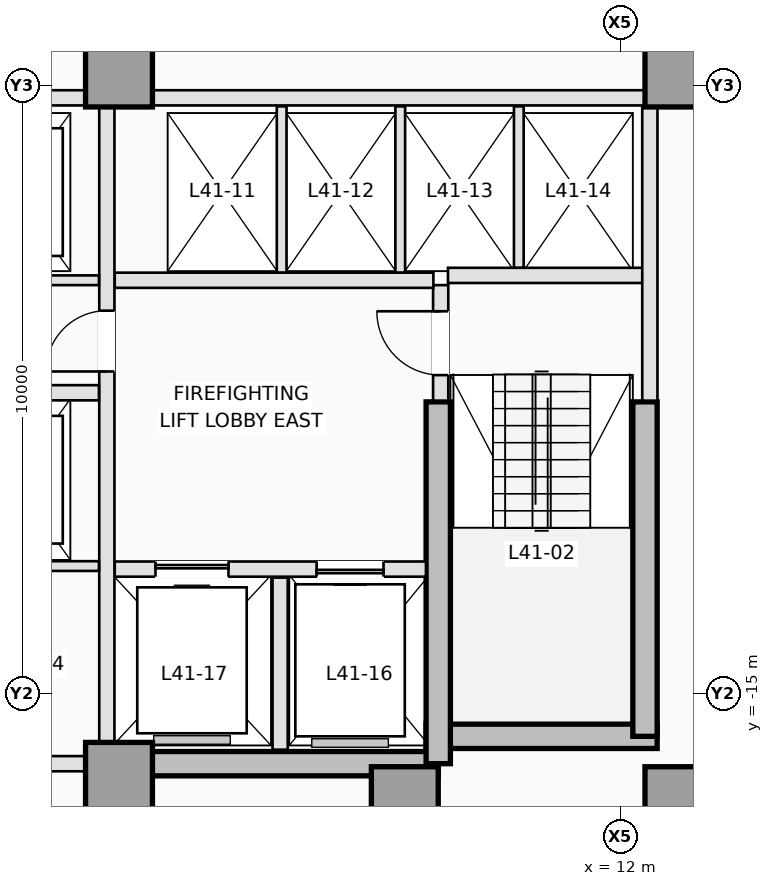
"""IFC4 building model, lengths in metres.
Left out: names, types, materials, properties, quantities, classifications, styles, units other than length and angle.
Written with IfcOpenShell. Run it as: python <this file> out.ifc"""

import sys

from ifc_helpers import new_model, si_unit, direction, frame, frame_2d, origin, origin_2d, place, context, subcontext, project, spatial, rectangle, extrude, element, fill, save


model = new_model("IFC4")
c1 = context("Model", 3, precision=1e-05, world=origin(), true_north=direction((0.0, 1.0)))
c2 = subcontext(c1, "Body", "Model", "MODEL_VIEW")
j1 = project(units=[si_unit("LENGTHUNIT", "METRE"), si_unit("PLANEANGLEUNIT", "RADIAN")], contexts=[c1])
p1 = place(None, origin())
s1 = spatial("IfcSite", under=j1, at=p1, CompositionType="ELEMENT")
p2 = place(p1, origin())
s2 = spatial("IfcBuilding", under=s1, at=p2, CompositionType="ELEMENT")
p3 = place(p2, frame((0.0, 0.0, 151.0)))
s3 = spatial("IfcBuildingStorey", under=s2, at=p3, CompositionType="ELEMENT", Elevation=151.0)
p4 = place(p3, frame((3.75, -16.15, 0.0), z_axis=(0.0, 0.0, 1.0), x_axis=(1.0, 0.0, 0.0)))
e1 = element("IfcWall", 1, at=p4, inside=s3, PredefinedType="SHEAR", context=c2, shape_type="SweptSolid", body=[
    extrude(rectangle(XDim=5.25, YDim=0.4, at=frame_2d((2.625, 0.0))), origin(), (0.0, 0.0, 1.0), 3.5),
])
p5 = place(p3, frame((8.8, -15.7, 0.0), z_axis=(0.0, 0.0, 1.0), x_axis=(1.0, 0.0, 0.0)))
e2 = element("IfcWall", 2, at=p5, inside=s3, PredefinedType="SHEAR", context=c2, shape_type="SweptSolid", body=[
    extrude(rectangle(XDim=3.8, YDim=0.4, at=frame_2d((1.9, 0.0))), origin(), (0.0, 0.0, 1.0), 3.5),
])
p6 = place(p3, frame((12.4, -15.7, 0.0), z_axis=(0.0, 0.0, 1.0), x_axis=(0.0, 1.0, 0.0)))
e3 = element("IfcWall", 3, at=p6, inside=s3, PredefinedType="SHEAR", context=c2, shape_type="SweptSolid", body=[
    extrude(rectangle(XDim=5.5, YDim=0.4, at=frame_2d((2.75, 0.0))), origin(), (0.0, 0.0, 1.0), 3.5),
])
p7 = place(p3, frame((9.0, -16.15, 0.0), z_axis=(0.0, 0.0, 1.0), x_axis=(0.0, 1.0, 0.0)))
e4 = element("IfcWall", 4, at=p7, inside=s3, PredefinedType="SHEAR", context=c2, shape_type="SweptSolid", body=[
    extrude(rectangle(XDim=5.95, YDim=0.4, at=frame_2d((2.975, 0.0))), origin(), (0.0, 0.0, 1.0), 3.5),
])
for number, where, z_axis, x_axis in (
    (5, (3.75, -16.35, 0.0), (0.0, 0.0, 1.0), (1.0, 0.0, 0.0)),
    (6, (8.45, -16.75, 0.0), (0.0, 0.0, 1.0), (1.0, 0.0, 0.0)),
    (7, (12.95, -16.75, 0.0), (0.0, 0.0, 1.0), (1.0, 0.0, 0.0)),
    (8, (3.75, -4.8, 0.0), (0.0, 0.0, 1.0), (1.0, 0.0, 0.0)),
    (9, (12.95, -4.8, 0.0), (0.0, 0.0, 1.0), (1.0, 0.0, 0.0)),
):
    element("IfcColumn", number, at=place(p3, frame(where, z_axis=z_axis, x_axis=x_axis)), inside=s3, PredefinedType="COLUMN", context=c2, shape_type="SweptSolid", body=[
        extrude(rectangle(XDim=1.1, YDim=1.1, at=origin_2d()), origin(), (0.0, 0.0, 1.0), 3.5),
    ])
p8 = place(p3, frame((9.04, -10.18, 0.0), z_axis=(0.0, 0.0, 1.0), x_axis=(0.0, 1.0, 0.0)))
e10 = element("IfcWall", 10, at=p8, inside=s3, PredefinedType="PARTITIONING", context=c2, shape_type="SweptSolid", body=[
    extrude(rectangle(XDim=1.9, YDim=0.25, at=frame_2d((0.95, 0.0))), origin(), (0.0, 0.0, 1.0), 3.25),
])
p9 = place(p8, frame((0.42, 0.0, 0.0)))
e11 = element("IfcOpeningElement", 11, at=p9, cuts=e10, PredefinedType="OPENING", context=c2, shape_type="SweptSolid", body=[
    extrude(rectangle(XDim=1.05, YDim=2.15, at=frame_2d((0.525, 1.075))), frame((0.0, 0.135, 0.0), z_axis=(0.0, -1.0, 0.0), x_axis=(1.0, 0.0, 0.0)), (0.0, 0.0, 1.0), 0.27),
])
p10 = place(p3, frame((9.16, -8.12, 0.0), z_axis=(0.0, 0.0, 1.0), x_axis=(1.0, 0.0, 0.0)))
e12 = element("IfcWall", 12, at=p10, inside=s3, PredefinedType="PARTITIONING", context=c2, shape_type="SweptSolid", body=[
    extrude(rectangle(XDim=3.22, YDim=0.25, at=frame_2d((1.61, 0.0))), origin(), (0.0, 0.0, 1.0), 3.25),
])
p11 = place(p3, frame((12.48, -10.18, 0.0), z_axis=(0.0, 0.0, 1.0), x_axis=(0.0, 1.0, 0.0)))
e13 = element("IfcWall", 13, at=p11, inside=s3, PredefinedType="PARTITIONING", context=c2, shape_type="SweptSolid", body=[
    extrude(rectangle(XDim=4.828, YDim=0.25, at=frame_2d((2.414, 0.0))), origin(), (0.0, 0.0, 1.0), 3.25),
])
p12 = place(p3, frame((3.68, -12.95, 0.0), z_axis=(0.0, 0.0, 1.0), x_axis=(1.0, 0.0, 0.0)))
e14 = element("IfcWall", 14, at=p12, inside=s3, PredefinedType="PARTITIONING", context=c2, shape_type="SweptSolid", body=[
    extrude(rectangle(XDim=5.118, YDim=0.25, at=frame_2d((2.559, 0.0))), origin(), (0.0, 0.0, 1.0), 3.25),
])
p13 = place(p12, frame((3.32, 0.0, 0.0)))
e15 = element("IfcOpeningElement", 15, at=p13, cuts=e14, PredefinedType="OPENING", context=c2, shape_type="SweptSolid", body=[
    extrude(rectangle(XDim=1.1, YDim=2.15, at=frame_2d((0.55, 1.075))), frame((0.0, 0.135, 0.0), z_axis=(0.0, -1.0, 0.0), x_axis=(1.0, 0.0, 0.0)), (0.0, 0.0, 1.0), 0.27),
])
p14 = place(p12, frame((0.67, 0.0, 0.0)))
e16 = element("IfcOpeningElement", 16, at=p14, cuts=e14, PredefinedType="OPENING", context=c2, shape_type="SweptSolid", body=[
    extrude(rectangle(XDim=1.2, YDim=2.15, at=frame_2d((0.6, 1.075))), frame((0.0, 0.135, 0.0), z_axis=(0.0, -1.0, 0.0), x_axis=(1.0, 0.0, 0.0)), (0.0, 0.0, 1.0), 0.27),
])
p15 = place(p3, frame((6.4, -15.92, 0.0), z_axis=(0.0, 0.0, 1.0), x_axis=(0.0, 1.0, 0.0)))
e17 = element("IfcWall", 17, at=p15, inside=s3, PredefinedType="PARTITIONING", context=c2, shape_type="SweptSolid", body=[
    extrude(rectangle(XDim=2.83, YDim=0.25, at=frame_2d((1.415, 0.0))), origin(), (0.0, 0.0, 1.0), 3.25),
])
p16 = place(p3, frame((3.68, -8.2, 0.0), z_axis=(0.0, 0.0, 1.0), x_axis=(1.0, 0.0, 0.0)))
e18 = element("IfcWall", 18, at=p16, inside=s3, PredefinedType="PARTITIONING", context=c2, shape_type="SweptSolid", body=[
    extrude(rectangle(XDim=5.24, YDim=0.25, at=frame_2d((2.62, 0.0))), origin(), (0.0, 0.0, 1.0), 3.25),
])
p17 = place(p3, frame((3.55, -15.798, 0.0), z_axis=(0.0, 0.0, 1.0), x_axis=(0.0, 1.0, 0.0)))
e19 = element("IfcWall", 19, at=p17, inside=s3, PredefinedType="PARTITIONING", context=c2, shape_type="SweptSolid", body=[
    extrude(rectangle(XDim=10.446, YDim=0.25, at=frame_2d((5.223, 0.0))), origin(), (0.0, 0.0, 1.0), 3.25),
])
p18 = place(p17, frame((6.098, 0.0, 0.0)))
e20 = element("IfcOpeningElement", 20, at=p18, cuts=e19, PredefinedType="OPENING", context=c2, shape_type="SweptSolid", body=[
    extrude(rectangle(XDim=1.0, YDim=2.15, at=frame_2d((0.5, 1.075))), frame((0.0, 0.135, 0.0), z_axis=(0.0, -1.0, 0.0), x_axis=(1.0, 0.0, 0.0)), (0.0, 0.0, 1.0), 0.27),
])
p19 = place(p3, frame((4.302, -5.2, 0.0), z_axis=(0.0, 0.0, 1.0), x_axis=(1.0, 0.0, 0.0)))
e21 = element("IfcWall", 21, at=p19, inside=s3, PredefinedType="PARTITIONING", context=c2, shape_type="SweptSolid", body=[
    extrude(rectangle(XDim=8.096, YDim=0.25, at=frame_2d((4.048, 0.0))), origin(), (0.0, 0.0, 1.0), 3.25),
])
p20 = place(p3, frame((0.95, -5.2, 0.0), z_axis=(0.0, 0.0, 1.0), x_axis=(1.0, 0.0, 0.0)))
e22 = element("IfcWall", 22, at=p20, inside=s3, PredefinedType="PARTITIONING", context=c2, shape_type="SweptSolid", body=[
    extrude(rectangle(XDim=2.248, YDim=0.25, at=frame_2d((1.124, 0.0))), origin(), (0.0, 0.0, 1.0), 3.25),
])
p21 = place(p20, frame((0.55, 0.0, 0.0)))
e23 = element("IfcOpeningElement", 23, at=p21, cuts=e22, PredefinedType="OPENING", context=c2, shape_type="SweptSolid", body=[
    extrude(rectangle(XDim=1.0, YDim=2.15, at=frame_2d((0.5, 1.075))), frame((0.0, 0.135, 0.0), z_axis=(0.0, -1.0, 0.0), x_axis=(1.0, 0.0, 0.0)), (0.0, 0.0, 1.0), 0.27),
])
for number, where, z_axis, x_axis in (
    (24, (6.425, -8.073, 0.0), (0.0, 0.0, 1.0), (0.0, 1.0, 0.0)),
    (25, (8.375, -8.073, 0.0), (0.0, 0.0, 1.0), (0.0, 1.0, 0.0)),
):
    element("IfcWall", number, at=place(p3, frame(where, z_axis=z_axis, x_axis=x_axis)), inside=s3, PredefinedType="PARTITIONING", context=c2, shape_type="SweptSolid", body=[
        extrude(rectangle(XDim=2.733, YDim=0.16, at=frame_2d((1.366, 0.0))), origin(), (0.0, 0.0, 1.0), 3.25),
    ])
p22 = place(p3, frame((10.325, -7.993, 0.0), z_axis=(0.0, 0.0, 1.0), x_axis=(0.0, 1.0, 0.0)))
e26 = element("IfcWall", 26, at=p22, inside=s3, PredefinedType="PARTITIONING", context=c2, shape_type="SweptSolid", body=[
    extrude(rectangle(XDim=2.653, YDim=0.16, at=frame_2d((1.326, 0.0))), origin(), (0.0, 0.0, 1.0), 3.25),
])
p23 = place(p3, frame((-3.198, -16.15, 0.0), z_axis=(0.0, 0.0, 1.0), x_axis=(1.0, 0.0, 0.0)))
e27 = element("IfcWall", 27, at=p23, inside=s3, PredefinedType="PARTITIONING", context=c2, shape_type="SweptSolid", body=[
    extrude(rectangle(XDim=6.396, YDim=0.25, at=frame_2d((3.198, 0.0))), origin(), (0.0, 0.0, 1.0), 2.45),
])
p24 = place(p3, frame((0.95, -8.2, 0.0), z_axis=(0.0, 0.0, 1.0), x_axis=(1.0, 0.0, 0.0)))
e28 = element("IfcWall", 28, at=p24, inside=s3, PredefinedType="PARTITIONING", context=c2, shape_type="SweptSolid", body=[
    extrude(rectangle(XDim=2.47, YDim=0.16, at=frame_2d((1.235, 0.0))), origin(), (0.0, 0.0, 1.0), 3.25),
])
p25 = place(p3, frame((0.95, -10.05, 0.0), z_axis=(0.0, 0.0, 1.0), x_axis=(1.0, 0.0, 0.0)))
e29 = element("IfcWall", 29, at=p25, inside=s3, PredefinedType="PARTITIONING", context=c2, shape_type="SweptSolid", body=[
    extrude(rectangle(XDim=2.47, YDim=0.25, at=frame_2d((1.235, 0.0))), origin(), (0.0, 0.0, 1.0), 3.25),
])
p26 = place(p25, frame((0.55, 0.0, 0.0)))
e30 = element("IfcOpeningElement", 30, at=p26, cuts=e29, PredefinedType="OPENING", context=c2, shape_type="SweptSolid", body=[
    extrude(rectangle(XDim=1.0, YDim=2.15, at=frame_2d((0.5, 1.075))), frame((0.0, 0.135, 0.0), z_axis=(0.0, -1.0, 0.0), x_axis=(1.0, 0.0, 0.0)), (0.0, 0.0, 1.0), 0.27),
])
p27 = place(p3, frame((-3.42, -12.9, 0.0), z_axis=(0.0, 0.0, 1.0), x_axis=(1.0, 0.0, 0.0)))
e31 = element("IfcWall", 31, at=p27, inside=s3, PredefinedType="PARTITIONING", context=c2, shape_type="SweptSolid", body=[
    extrude(rectangle(XDim=6.84, YDim=0.16, at=frame_2d((3.42, 0.0))), origin(), (0.0, 0.0, 1.0), 3.25),
])
p28 = place(p27, frame((2.98, 0.0, 0.0)))
e32 = element("IfcOpeningElement", 32, at=p28, cuts=e31, PredefinedType="OPENING", context=c2, shape_type="SweptSolid", body=[
    extrude(rectangle(XDim=0.88, YDim=2.12, at=frame_2d((0.44, 1.06))), frame((0.0, 0.09, 0.0), z_axis=(0.0, -1.0, 0.0), x_axis=(1.0, 0.0, 0.0)), (0.0, 0.0, 1.0), 0.18),
])
p29 = place(p13, origin())
e33 = element("IfcDoor", 33, at=p29, inside=s3, OperationType="SLIDING_TO_RIGHT", PredefinedType="DOOR", context=c2, shape_type="SweptSolid", body=[
    extrude(rectangle(XDim=1.1, YDim=2.15, at=frame_2d((0.55, 1.075))), frame((0.0, 0.025, 0.0), z_axis=(0.0, -1.0, 0.0), x_axis=(1.0, 0.0, 0.0)), (0.0, 0.0, 1.0), 0.05),
])
fill(e15, e33)
p30 = place(p14, origin())
e34 = element("IfcDoor", 34, at=p30, inside=s3, OperationType="SLIDING_TO_LEFT", PredefinedType="DOOR", context=c2, shape_type="SweptSolid", body=[
    extrude(rectangle(XDim=1.2, YDim=2.15, at=frame_2d((0.6, 1.075))), frame((0.0, 0.025, 0.0), z_axis=(0.0, -1.0, 0.0), x_axis=(1.0, 0.0, 0.0)), (0.0, 0.0, 1.0), 0.05),
])
fill(e16, e34)
p31 = place(p9, origin())
e35 = element("IfcDoor", 35, at=p31, inside=s3, OperationType="SINGLE_SWING_RIGHT", PredefinedType="DOOR", context=c2, shape_type="SweptSolid", body=[
    extrude(rectangle(XDim=1.05, YDim=2.15, at=frame_2d((0.525, 1.075))), frame((0.0, 0.025, 0.0), z_axis=(0.0, -1.0, 0.0), x_axis=(1.0, 0.0, 0.0)), (0.0, 0.0, 1.0), 0.05),
])
fill(e11, e35)
p32 = place(p18, origin())
e36 = element("IfcDoor", 36, at=p32, inside=s3, OperationType="SINGLE_SWING_LEFT", PredefinedType="DOOR", context=c2, shape_type="SweptSolid", body=[
    extrude(rectangle(XDim=1.0, YDim=2.15, at=frame_2d((0.5, 1.075))), frame((0.0, 0.025, 0.0), z_axis=(0.0, -1.0, 0.0), x_axis=(1.0, 0.0, 0.0)), (0.0, 0.0, 1.0), 0.05),
])
fill(e20, e36)
save(model, sys.argv[1])
